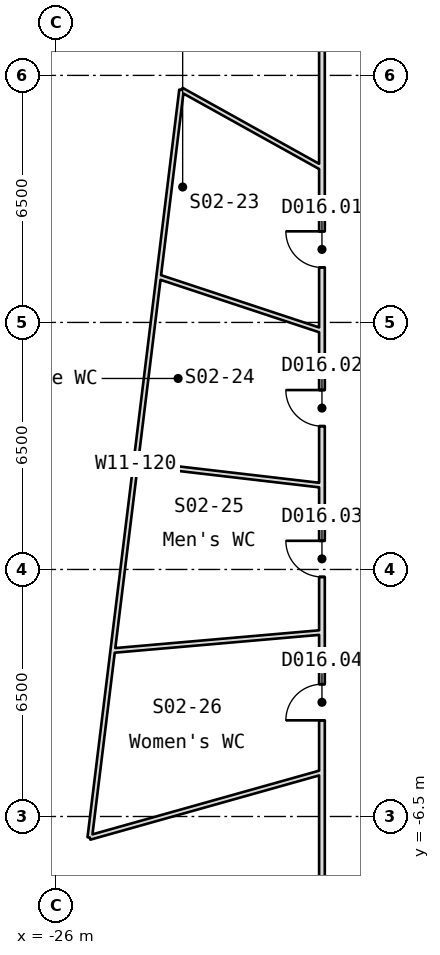
"""IFC4 building model, lengths in metres.
Left out: names, types, materials, properties, quantities, classifications, styles, units other than length and angle.
Written with IfcOpenShell. Run it as: python <this file> out.ifc"""

import sys

from ifc_helpers import new_model, si_unit, direction, frame, frame_2d, origin, place, context, subcontext, project, spatial, rectangle, extrude, element, fill, save


model = new_model("IFC4")
c1 = context("Model", 3, precision=1e-05, world=origin(), true_north=direction((0.0, 1.0)))
c2 = subcontext(c1, "Body", "Model", "MODEL_VIEW")
j1 = project(units=[si_unit("LENGTHUNIT", "METRE"), si_unit("PLANEANGLEUNIT", "RADIAN")], contexts=[c1])
p1 = place(None, origin())
s1 = spatial("IfcSite", under=j1, at=p1, CompositionType="ELEMENT")
p2 = place(p1, origin())
s2 = spatial("IfcBuilding", under=s1, at=p2, CompositionType="ELEMENT")
p3 = place(p2, frame((0.0, 0.0, 45.45)))
s3 = spatial("IfcBuildingStorey", under=s2, at=p3, CompositionType="ELEMENT", Elevation=45.45)
p4 = place(p3, frame((-24.506, -2.134, 0.0), z_axis=(0.0, 0.0, 1.0), x_axis=(0.996225821909, 0.086799261298, 0.0)))
e1 = element("IfcWall", 1, at=p4, inside=s3, PredefinedType="PARTITIONING", context=c2, shape_type="SweptSolid", body=[
    extrude(rectangle(XDim=5.527, YDim=0.12, at=frame_2d((2.763, 0.0))), origin(), (0.0, 0.0, 1.0), 3.97),
])
p5 = place(p3, frame((-23.903, 2.784, 0.0), z_axis=(0.0, 0.0, 1.0), x_axis=(0.993284661568, -0.115696072078, 0.0)))
e2 = element("IfcWall", 2, at=p5, inside=s3, PredefinedType="PARTITIONING", context=c2, shape_type="SweptSolid", body=[
    extrude(rectangle(XDim=4.936, YDim=0.12, at=frame_2d((2.468, 0.0))), origin(), (0.0, 0.0, 1.0), 3.97),
])
p6 = place(p3, frame((-23.299, 7.701, 0.0), z_axis=(0.0, 0.0, 1.0), x_axis=(0.949467582408, -0.313865114271, 0.0)))
e3 = element("IfcWall", 3, at=p6, inside=s3, PredefinedType="PARTITIONING", context=c2, shape_type="SweptSolid", body=[
    extrude(rectangle(XDim=4.528, YDim=0.12, at=frame_2d((2.264, 0.0))), origin(), (0.0, 0.0, 1.0), 3.97),
])
p7 = place(p3, frame((-22.695, 12.619, 0.0), z_axis=(0.0, 0.0, 1.0), x_axis=(-0.121832964423, -0.992550617742, 0.0)))
e4 = element("IfcWall", 4, at=p7, inside=s3, PredefinedType="PARTITIONING", context=c2, shape_type="SweptSolid", body=[
    extrude(rectangle(XDim=19.819, YDim=0.12, at=frame_2d((9.909, 0.0))), origin(), (0.0, 0.0, 1.0), 3.97),
])
p8 = place(p3, frame((-22.695, 12.619, 0.0), z_axis=(0.0, 0.0, 1.0), x_axis=(0.87398290434, -0.485956667741, 0.0)))
e5 = element("IfcWall", 5, at=p8, inside=s3, PredefinedType="PARTITIONING", context=c2, shape_type="SweptSolid", body=[
    extrude(rectangle(XDim=4.228, YDim=0.12, at=frame_2d((2.114, 0.0))), origin(), (0.0, 0.0, 1.0), 3.358),
])
p9 = place(p3, frame((-19.0, -16.0, 0.0), z_axis=(0.0, 0.0, 1.0), x_axis=(0.0, 1.0, 0.0)))
e6 = element("IfcWall", 6, at=p9, inside=s3, PredefinedType="PARTITIONING", context=c2, shape_type="SweptSolid", body=[
    extrude(rectangle(XDim=32.0, YDim=0.15, at=frame_2d((16.0, 0.0))), origin(), (0.0, 0.0, 1.0), 3.97),
])
p10 = place(p9, frame((23.947, 0.0, 0.0)))
e7 = element("IfcOpeningElement", 7, at=p10, cuts=e6, PredefinedType="OPENING", context=c2, shape_type="SweptSolid", body=[
    extrude(rectangle(XDim=0.95, YDim=2.1, at=frame_2d((0.475, 1.05))), frame((0.0, 0.085, 0.0), z_axis=(0.0, -1.0, 0.0), x_axis=(1.0, 0.0, 0.0)), (0.0, 0.0, 1.0), 0.17),
])
p11 = place(p9, frame((19.771, 0.0, 0.0)))
e8 = element("IfcOpeningElement", 8, at=p11, cuts=e6, PredefinedType="OPENING", context=c2, shape_type="SweptSolid", body=[
    extrude(rectangle(XDim=0.95, YDim=2.1, at=frame_2d((0.475, 1.05))), frame((0.0, 0.085, 0.0), z_axis=(0.0, -1.0, 0.0), x_axis=(1.0, 0.0, 0.0)), (0.0, 0.0, 1.0), 0.17),
])
p12 = place(p9, frame((15.804, 0.0, 0.0)))
e9 = element("IfcOpeningElement", 9, at=p12, cuts=e6, PredefinedType="OPENING", context=c2, shape_type="SweptSolid", body=[
    extrude(rectangle(XDim=0.95, YDim=2.1, at=frame_2d((0.475, 1.05))), frame((0.0, 0.085, 0.0), z_axis=(0.0, -1.0, 0.0), x_axis=(1.0, 0.0, 0.0)), (0.0, 0.0, 1.0), 0.17),
])
p13 = place(p9, frame((12.03, 0.0, 0.0)))
e10 = element("IfcOpeningElement", 10, at=p13, cuts=e6, PredefinedType="OPENING", context=c2, shape_type="SweptSolid", body=[
    extrude(rectangle(XDim=0.95, YDim=2.1, at=frame_2d((0.475, 1.05))), frame((0.0, 0.085, 0.0), z_axis=(0.0, -1.0, 0.0), x_axis=(1.0, 0.0, 0.0)), (0.0, 0.0, 1.0), 0.17),
])
p14 = place(p3, frame((-19.0, -5.336, 0.0), z_axis=(0.0, 0.0, 1.0), x_axis=(-0.962746758525, -0.270404657783, 0.0)))
e11 = element("IfcWall", 11, at=p14, inside=s3, PredefinedType="PARTITIONING", context=c2, shape_type="SweptSolid", body=[
    extrude(rectangle(XDim=6.346, YDim=0.12, at=frame_2d((3.173, 0.0))), origin(), (0.0, 0.0, 1.0), 3.277),
])
p15 = place(p10, origin())
e12 = element("IfcDoor", 12, at=p15, inside=s3, OperationType="SINGLE_SWING_RIGHT", PredefinedType="DOOR", context=c2, shape_type="SweptSolid", body=[
    extrude(rectangle(XDim=0.95, YDim=2.1, at=frame_2d((0.475, 1.05))), frame((0.0, 0.025, 0.0), z_axis=(0.0, -1.0, 0.0), x_axis=(1.0, 0.0, 0.0)), (0.0, 0.0, 1.0), 0.05),
])
fill(e7, e12)
p16 = place(p11, origin())
e13 = element("IfcDoor", 13, at=p16, inside=s3, OperationType="SINGLE_SWING_RIGHT", PredefinedType="DOOR", context=c2, shape_type="SweptSolid", body=[
    extrude(rectangle(XDim=0.95, YDim=2.1, at=frame_2d((0.475, 1.05))), frame((0.0, 0.025, 0.0), z_axis=(0.0, -1.0, 0.0), x_axis=(1.0, 0.0, 0.0)), (0.0, 0.0, 1.0), 0.05),
])
fill(e8, e13)
p17 = place(p12, origin())
e14 = element("IfcDoor", 14, at=p17, inside=s3, OperationType="SINGLE_SWING_RIGHT", PredefinedType="DOOR", context=c2, shape_type="SweptSolid", body=[
    extrude(rectangle(XDim=0.95, YDim=2.1, at=frame_2d((0.475, 1.05))), frame((0.0, 0.025, 0.0), z_axis=(0.0, -1.0, 0.0), x_axis=(1.0, 0.0, 0.0)), (0.0, 0.0, 1.0), 0.05),
])
fill(e9, e14)
p18 = place(p13, origin())
e15 = element("IfcDoor", 15, at=p18, inside=s3, OperationType="SINGLE_SWING_RIGHT", PredefinedType="DOOR", context=c2, shape_type="SweptSolid", body=[
    extrude(rectangle(XDim=0.95, YDim=2.1, at=frame_2d((0.475, 1.05))), frame((0.0, 0.025, 0.0), z_axis=(0.0, -1.0, 0.0), x_axis=(1.0, 0.0, 0.0)), (0.0, 0.0, 1.0), 0.05),
])
fill(e10, e15)
save(model, sys.argv[1])
